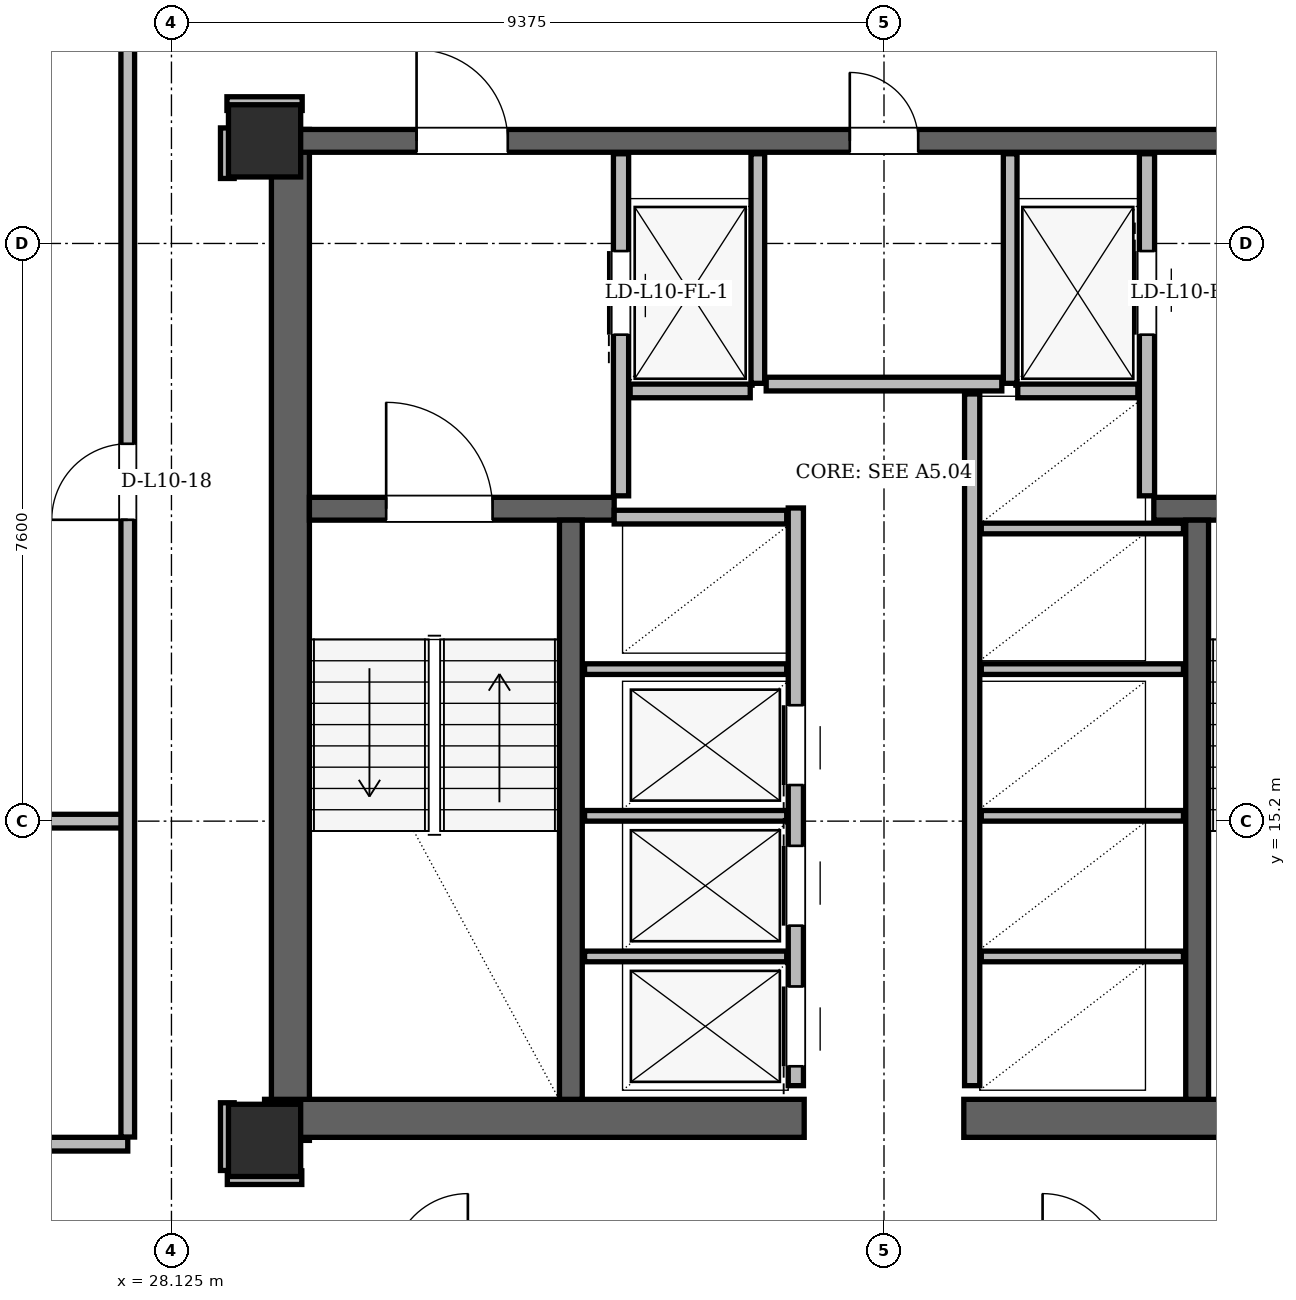
"""IFC4 building model, lengths in metres.
Left out: names, types, materials, properties, quantities, classifications, styles, units other than length and angle.
Written with IfcOpenShell. Run it as: python <this file> out.ifc"""

import sys

from ifc_helpers import new_model, si_unit, direction, frame, frame_2d, origin, origin_2d, place, context, subcontext, project, spatial, rectangle, hollow_rectangle, extrude, element, fill, save


model = new_model("IFC4")
c1 = context("Model", 3, precision=1e-05, world=origin(), true_north=direction((0.0, 1.0)))
c2 = subcontext(c1, "Body", "Model", "MODEL_VIEW")
j1 = project(units=[si_unit("LENGTHUNIT", "METRE"), si_unit("PLANEANGLEUNIT", "RADIAN")], contexts=[c1])
p1 = place(None, origin())
s1 = spatial("IfcSite", under=j1, at=p1, CompositionType="ELEMENT")
p2 = place(p1, origin())
s2 = spatial("IfcBuilding", under=s1, at=p2, CompositionType="ELEMENT")
p3 = place(p2, frame((0.0, 0.0, 41.7)))
s3 = spatial("IfcBuildingStorey", under=s2, at=p3, CompositionType="ELEMENT", Elevation=41.7)
for number, where, z_axis, x_axis in (
    (1, (29.35, 11.0, 0.0), (0.0, 0.0, 1.0), (1.0, 0.0, 0.0)),
    (2, (29.35, 24.15, 0.0), (0.0, 0.0, 1.0), (1.0, 0.0, 0.0)),
):
    element("IfcColumn", number, at=place(p3, frame(where, z_axis=z_axis, x_axis=x_axis)), inside=s3, PredefinedType="COLUMN", context=c2, shape_type="SweptSolid", body=[
        extrude(hollow_rectangle(XDim=0.95, YDim=0.95, WallThickness=0.08, at=origin_2d()), origin(), (0.0, 0.0, 1.0), 3.6),
    ])
p4 = place(p3, frame((29.69, 11.0, 0.0), z_axis=(0.0, 0.0, 1.0), x_axis=(0.0, 1.0, 0.0)))
e3 = element("IfcWall", 3, at=p4, inside=s3, PredefinedType="SHEAR", context=c2, shape_type="SweptSolid", body=[
    extrude(rectangle(XDim=13.3, YDim=0.5, at=frame_2d((6.65, 0.0))), origin(), (0.0, 0.0, 1.0), 3.36),
])
for number, where, z_axis, x_axis in (
    (4, (29.35, 11.29, 0.0), (0.0, 0.0, 1.0), (1.0, 0.0, 0.0)),
    (5, (38.55, 11.29, 0.0), (0.0, 0.0, 1.0), (1.0, 0.0, 0.0)),
):
    element("IfcWall", number, at=place(p3, frame(where, z_axis=z_axis, x_axis=x_axis)), inside=s3, PredefinedType="SHEAR", context=c2, shape_type="SweptSolid", body=[
        extrude(rectangle(XDim=7.1, YDim=0.5, at=frame_2d((3.55, 0.0))), origin(), (0.0, 0.0, 1.0), 3.36),
    ])
p5 = place(p3, frame((29.65, 24.15, 0.0), z_axis=(0.0, 0.0, 1.0), x_axis=(1.0, 0.0, 0.0)))
e6 = element("IfcWall", 6, at=p5, inside=s3, PredefinedType="SHEAR", context=c2, shape_type="SweptSolid", body=[
    extrude(rectangle(XDim=15.7, YDim=0.3, at=frame_2d((7.85, 0.0))), origin(), (0.0, 0.0, 1.0), 3.36),
])
p6 = place(p5, frame((1.7, 0.0, 0.0)))
e7 = element("IfcOpeningElement", 7, at=p6, cuts=e6, PredefinedType="OPENING", context=c2, shape_type="SweptSolid", body=[
    extrude(rectangle(XDim=1.2, YDim=2.2, at=frame_2d((0.6, 1.1))), frame((0.0, 0.15, 0.0), z_axis=(0.0, -1.0, 0.0), x_axis=(1.0, 0.0, 0.0)), (0.0, 0.0, 1.0), 0.3),
])
p7 = place(p5, frame((12.8, 0.0, 0.0)))
e8 = element("IfcOpeningElement", 8, at=p7, cuts=e6, PredefinedType="OPENING", context=c2, shape_type="SweptSolid", body=[
    extrude(rectangle(XDim=1.2, YDim=2.2, at=frame_2d((0.6, 1.1))), frame((0.0, 0.15, 0.0), z_axis=(0.0, -1.0, 0.0), x_axis=(1.0, 0.0, 0.0)), (0.0, 0.0, 1.0), 0.3),
])
p8 = place(p5, frame((7.4, 0.0, 0.0)))
e9 = element("IfcOpeningElement", 9, at=p8, cuts=e6, PredefinedType="OPENING", context=c2, shape_type="SweptSolid", body=[
    extrude(rectangle(XDim=0.9, YDim=2.05, at=frame_2d((0.45, 1.025))), frame((0.0, 0.15, 0.0), z_axis=(0.0, -1.0, 0.0), x_axis=(1.0, 0.0, 0.0)), (0.0, 0.0, 1.0), 0.3),
])
p9 = place(p3, frame((29.94, 19.31, 0.0), z_axis=(0.0, 0.0, 1.0), x_axis=(1.0, 0.0, 0.0)))
e10 = element("IfcWall", 10, at=p9, inside=s3, PredefinedType="SHEAR", context=c2, shape_type="SweptSolid", body=[
    extrude(rectangle(XDim=4.01, YDim=0.3, at=frame_2d((2.005, 0.0))), origin(), (0.0, 0.0, 1.0), 3.36),
])
p10 = place(p9, frame((1.01, 0.0, 0.0)))
e11 = element("IfcOpeningElement", 11, at=p10, cuts=e10, PredefinedType="OPENING", context=c2, shape_type="SweptSolid", body=[
    extrude(rectangle(XDim=1.4, YDim=2.2, at=frame_2d((0.7, 1.1))), frame((0.0, 0.15, 0.0), z_axis=(0.0, -1.0, 0.0), x_axis=(1.0, 0.0, 0.0)), (0.0, 0.0, 1.0), 0.3),
])
p11 = place(p3, frame((41.05, 19.31, 0.0), z_axis=(0.0, 0.0, 1.0), x_axis=(1.0, 0.0, 0.0)))
e12 = element("IfcWall", 12, at=p11, inside=s3, PredefinedType="SHEAR", context=c2, shape_type="SweptSolid", body=[
    extrude(rectangle(XDim=4.01, YDim=0.3, at=frame_2d((2.005, 0.0))), origin(), (0.0, 0.0, 1.0), 3.36),
])
p12 = place(p11, frame((1.6, 0.0, 0.0)))
e13 = element("IfcOpeningElement", 13, at=p12, cuts=e12, PredefinedType="OPENING", context=c2, shape_type="SweptSolid", body=[
    extrude(rectangle(XDim=1.4, YDim=2.2, at=frame_2d((0.7, 1.1))), frame((0.0, 0.15, 0.0), z_axis=(0.0, -1.0, 0.0), x_axis=(1.0, 0.0, 0.0)), (0.0, 0.0, 1.0), 0.3),
])
for number, where, z_axis, x_axis in (
    (14, (33.38, 11.54, 0.0), (0.0, 0.0, 1.0), (0.0, 1.0, 0.0)),
    (15, (41.62, 11.54, 0.0), (0.0, 0.0, 1.0), (0.0, 1.0, 0.0)),
):
    element("IfcWall", number, at=place(p3, frame(where, z_axis=z_axis, x_axis=x_axis)), inside=s3, PredefinedType="SHEAR", context=c2, shape_type="SweptSolid", body=[
        extrude(rectangle(XDim=7.62, YDim=0.3, at=frame_2d((3.81, 0.0))), origin(), (0.0, 0.0, 1.0), 3.36),
    ])
p13 = place(p3, frame((29.911, 43.603, 0.0), z_axis=(0.0, 0.0, 1.0), x_axis=(-0.500002585961, -0.866023910774, 0.0)))
e16 = element("IfcWall", 16, at=p13, inside=s3, PredefinedType="SOLIDWALL", context=c2, shape_type="SweptSolid", body=[
    extrude(rectangle(XDim=33.118, YDim=0.34, at=frame_2d((16.559, 0.0))), origin(), (0.0, 0.0, 1.0), 2.494),
])
p14 = place(p13, frame((6.369, 0.0, 0.0)))
e17 = element("IfcOpeningElement", 17, at=p14, cuts=e16, PredefinedType="OPENING", context=c2, shape_type="SweptSolid", body=[
    extrude(rectangle(XDim=1.5, YDim=2.2, at=frame_2d((0.75, 1.1))), frame((0.0, 0.17, 0.0), z_axis=(0.0, -1.0, 0.0), x_axis=(1.0, 0.0, 0.0)), (0.0, 0.0, 1.0), 0.34),
])
p15 = place(p13, frame((25.574, 0.0, 0.0)))
e18 = element("IfcOpeningElement", 18, at=p15, cuts=e16, PredefinedType="OPENING", context=c2, shape_type="SweptSolid", body=[
    extrude(rectangle(XDim=1.3, YDim=2.2, at=frame_2d((0.65, 1.1))), frame((0.0, 0.17, 0.0), z_axis=(0.0, -1.0, 0.0), x_axis=(1.0, 0.0, 0.0)), (0.0, 0.0, 1.0), 0.34),
])
p16 = place(p13, frame((11.131, 0.0, 0.85)))
e19 = element("IfcOpeningElement", 19, at=p16, cuts=e16, PredefinedType="OPENING", context=c2, shape_type="SweptSolid", body=[
    extrude(rectangle(XDim=2.0, YDim=1.534, at=frame_2d((1.0, 0.767))), frame((0.0, 0.17, 0.0), z_axis=(0.0, -1.0, 0.0), x_axis=(1.0, 0.0, 0.0)), (0.0, 0.0, 1.0), 0.34),
])
p17 = place(p13, frame((18.613, 0.0, 0.85)))
e20 = element("IfcOpeningElement", 20, at=p17, cuts=e16, PredefinedType="OPENING", context=c2, shape_type="SweptSolid", body=[
    extrude(rectangle(XDim=1.4, YDim=1.534, at=frame_2d((0.7, 0.767))), frame((0.0, 0.17, 0.0), z_axis=(0.0, -1.0, 0.0), x_axis=(1.0, 0.0, 0.0)), (0.0, 0.0, 1.0), 0.34),
])
p18 = place(p13, frame((30.251, 0.0, 0.85)))
e21 = element("IfcOpeningElement", 21, at=p18, cuts=e16, PredefinedType="OPENING", context=c2, shape_type="SweptSolid", body=[
    extrude(rectangle(XDim=1.8, YDim=1.534, at=frame_2d((0.9, 0.767))), frame((0.0, 0.17, 0.0), z_axis=(0.0, -1.0, 0.0), x_axis=(1.0, 0.0, 0.0)), (0.0, 0.0, 1.0), 0.34),
])
p19 = place(p13, frame((28.524, 0.0, 0.85)))
e22 = element("IfcOpeningElement", 22, at=p19, cuts=e16, PredefinedType="OPENING", context=c2, shape_type="SweptSolid", body=[
    extrude(rectangle(XDim=1.2, YDim=1.48, at=frame_2d((0.6, 0.74))), frame((0.0, 0.17, 0.0), z_axis=(0.0, -1.0, 0.0), x_axis=(1.0, 0.0, 0.0)), (0.0, 0.0, 1.0), 0.34),
])
p20 = place(p3, frame((34.04, 19.48, 0.0), z_axis=(0.0, 0.0, 1.0), x_axis=(0.0, 1.0, 0.0)))
e23 = element("IfcWall", 23, at=p20, inside=s3, PredefinedType="PARTITIONING", context=c2, shape_type="SweptSolid", body=[
    extrude(rectangle(XDim=4.5, YDim=0.2, at=frame_2d((2.25, 0.0))), origin(), (0.0, 0.0, 1.0), 2.4),
])
p21 = place(p20, frame((2.12, 0.0, 0.0)))
e24 = element("IfcOpeningElement", 24, at=p21, cuts=e23, PredefinedType="OPENING", context=c2, shape_type="SweptSolid", body=[
    extrude(rectangle(XDim=1.1, YDim=2.2, at=frame_2d((0.55, 1.1))), frame((0.0, 0.1, 0.0), z_axis=(0.0, -1.0, 0.0), x_axis=(1.0, 0.0, 0.0)), (0.0, 0.0, 1.0), 0.2),
])
p22 = place(p3, frame((35.84, 20.96, 0.0), z_axis=(0.0, 0.0, 1.0), x_axis=(0.0, 1.0, 0.0)))
e25 = element("IfcWall", 25, at=p22, inside=s3, PredefinedType="PARTITIONING", context=c2, shape_type="SweptSolid", body=[
    extrude(rectangle(XDim=3.02, YDim=0.18, at=frame_2d((1.51, 0.0))), origin(), (0.0, 0.0, 1.0), 2.4),
])
p23 = place(p3, frame((34.16, 20.86, 0.0), z_axis=(0.0, 0.0, 1.0), x_axis=(1.0, 0.0, 0.0)))
e26 = element("IfcWall", 26, at=p23, inside=s3, PredefinedType="PARTITIONING", context=c2, shape_type="SweptSolid", body=[
    extrude(rectangle(XDim=1.58, YDim=0.18, at=frame_2d((0.79, 0.0))), origin(), (0.0, 0.0, 1.0), 3.36),
])
p24 = place(p3, frame((40.96, 19.48, 0.0), z_axis=(0.0, 0.0, 1.0), x_axis=(0.0, 1.0, 0.0)))
e27 = element("IfcWall", 27, at=p24, inside=s3, PredefinedType="PARTITIONING", context=c2, shape_type="SweptSolid", body=[
    extrude(rectangle(XDim=4.5, YDim=0.2, at=frame_2d((2.25, 0.0))), origin(), (0.0, 0.0, 1.0), 2.4),
])
p25 = place(p24, frame((2.12, 0.0, 0.0)))
e28 = element("IfcOpeningElement", 28, at=p25, cuts=e27, PredefinedType="OPENING", context=c2, shape_type="SweptSolid", body=[
    extrude(rectangle(XDim=1.1, YDim=2.2, at=frame_2d((0.55, 1.1))), frame((0.0, 0.1, 0.0), z_axis=(0.0, -1.0, 0.0), x_axis=(1.0, 0.0, 0.0)), (0.0, 0.0, 1.0), 0.2),
])
p26 = place(p3, frame((39.16, 20.96, 0.0), z_axis=(0.0, 0.0, 1.0), x_axis=(0.0, 1.0, 0.0)))
e29 = element("IfcWall", 29, at=p26, inside=s3, PredefinedType="PARTITIONING", context=c2, shape_type="SweptSolid", body=[
    extrude(rectangle(XDim=3.02, YDim=0.18, at=frame_2d((1.51, 0.0))), origin(), (0.0, 0.0, 1.0), 2.4),
])
p27 = place(p3, frame((39.26, 20.86, 0.0), z_axis=(0.0, 0.0, 1.0), x_axis=(1.0, 0.0, 0.0)))
e30 = element("IfcWall", 30, at=p27, inside=s3, PredefinedType="PARTITIONING", context=c2, shape_type="SweptSolid", body=[
    extrude(rectangle(XDim=1.58, YDim=0.18, at=frame_2d((0.79, 0.0))), origin(), (0.0, 0.0, 1.0), 3.36),
])
p28 = place(p3, frame((36.34, 11.72, 0.0), z_axis=(0.0, 0.0, 1.0), x_axis=(0.0, 1.0, 0.0)))
e31 = element("IfcWall", 31, at=p28, inside=s3, PredefinedType="PARTITIONING", context=c2, shape_type="SweptSolid", body=[
    extrude(rectangle(XDim=7.6, YDim=0.2, at=frame_2d((3.8, 0.0))), origin(), (0.0, 0.0, 1.0), 3.36),
])
p29 = place(p28, frame((0.255, 0.0, 0.0)))
e32 = element("IfcOpeningElement", 32, at=p29, cuts=e31, PredefinedType="OPENING", context=c2, shape_type="SweptSolid", body=[
    extrude(rectangle(XDim=1.05, YDim=2.15, at=frame_2d((0.525, 1.075))), frame((0.0, 0.1, 0.0), z_axis=(0.0, -1.0, 0.0), x_axis=(1.0, 0.0, 0.0)), (0.0, 0.0, 1.0), 0.2),
])
p30 = place(p28, frame((2.105, 0.0, 0.0)))
e33 = element("IfcOpeningElement", 33, at=p30, cuts=e31, PredefinedType="OPENING", context=c2, shape_type="SweptSolid", body=[
    extrude(rectangle(XDim=1.05, YDim=2.15, at=frame_2d((0.525, 1.075))), frame((0.0, 0.1, 0.0), z_axis=(0.0, -1.0, 0.0), x_axis=(1.0, 0.0, 0.0)), (0.0, 0.0, 1.0), 0.2),
])
p31 = place(p28, frame((3.955, 0.0, 0.0)))
e34 = element("IfcOpeningElement", 34, at=p31, cuts=e31, PredefinedType="OPENING", context=c2, shape_type="SweptSolid", body=[
    extrude(rectangle(XDim=1.05, YDim=2.15, at=frame_2d((0.525, 1.075))), frame((0.0, 0.1, 0.0), z_axis=(0.0, -1.0, 0.0), x_axis=(1.0, 0.0, 0.0)), (0.0, 0.0, 1.0), 0.2),
])
p32 = place(p3, frame((33.95, 19.2, 0.0), z_axis=(0.0, 0.0, 1.0), x_axis=(1.0, 0.0, 0.0)))
e35 = element("IfcWall", 35, at=p32, inside=s3, PredefinedType="PARTITIONING", context=c2, shape_type="SweptSolid", body=[
    extrude(rectangle(XDim=2.27, YDim=0.18, at=frame_2d((1.135, 0.0))), origin(), (0.0, 0.0, 1.0), 3.36),
])
for number, where, z_axis, x_axis in (
    (36, (33.56, 13.42, 0.0), (0.0, 0.0, 1.0), (1.0, 0.0, 0.0)),
    (37, (33.56, 15.27, 0.0), (0.0, 0.0, 1.0), (1.0, 0.0, 0.0)),
    (38, (33.56, 17.2, 0.0), (0.0, 0.0, 1.0), (1.0, 0.0, 0.0)),
):
    element("IfcWall", number, at=place(p3, frame(where, z_axis=z_axis, x_axis=x_axis)), inside=s3, PredefinedType="PARTITIONING", context=c2, shape_type="SweptSolid", body=[
        extrude(rectangle(XDim=2.66, YDim=0.14, at=frame_2d((1.33, 0.0))), origin(), (0.0, 0.0, 1.0), 3.36),
    ])
p33 = place(p3, frame((38.66, 11.72, 0.0), z_axis=(0.0, 0.0, 1.0), x_axis=(0.0, 1.0, 0.0)))
e39 = element("IfcWall", 39, at=p33, inside=s3, PredefinedType="PARTITIONING", context=c2, shape_type="SweptSolid", body=[
    extrude(rectangle(XDim=9.1, YDim=0.2, at=frame_2d((4.55, 0.0))), origin(), (0.0, 0.0, 1.0), 3.36),
])
for number, where, z_axis, x_axis in (
    (40, (38.78, 13.42, 0.0), (0.0, 0.0, 1.0), (1.0, 0.0, 0.0)),
    (41, (38.78, 15.27, 0.0), (0.0, 0.0, 1.0), (1.0, 0.0, 0.0)),
    (42, (38.78, 17.2, 0.0), (0.0, 0.0, 1.0), (1.0, 0.0, 0.0)),
    (43, (38.78, 19.05, 0.0), (0.0, 0.0, 1.0), (1.0, 0.0, 0.0)),
):
    element("IfcWall", number, at=place(p3, frame(where, z_axis=z_axis, x_axis=x_axis)), inside=s3, PredefinedType="PARTITIONING", context=c2, shape_type="SweptSolid", body=[
        extrude(rectangle(XDim=2.66, YDim=0.14, at=frame_2d((1.33, 0.0))), origin(), (0.0, 0.0, 1.0), 3.36),
    ])
p34 = place(p3, frame((35.95, 20.95, 0.0), z_axis=(0.0, 0.0, 1.0), x_axis=(1.0, 0.0, 0.0)))
e44 = element("IfcWall", 44, at=p34, inside=s3, PredefinedType="PARTITIONING", context=c2, shape_type="SweptSolid", body=[
    extrude(rectangle(XDim=3.1, YDim=0.18, at=frame_2d((1.55, 0.0))), origin(), (0.0, 0.0, 1.0), 3.36),
])
p35 = place(p3, frame((28.86, 10.51, 0.0), z_axis=(0.0, 0.0, 1.0), x_axis=(1.0, 0.0, 0.0)))
e45 = element("IfcWall", 45, at=p35, inside=s3, PredefinedType="PARTITIONING", context=c2, shape_type="SweptSolid", body=[
    extrude(rectangle(XDim=0.98, YDim=0.18, at=frame_2d((0.49, 0.0))), origin(), (0.0, 0.0, 1.0), 2.738),
])
p36 = place(p3, frame((19.2, 10.95, 0.0), z_axis=(0.0, 0.0, 1.0), x_axis=(1.0, 0.0, 0.0)))
e46 = element("IfcWall", 46, at=p36, inside=s3, PredefinedType="PARTITIONING", context=c2, shape_type="SweptSolid", body=[
    extrude(rectangle(XDim=8.35, YDim=0.18, at=frame_2d((4.175, 0.0))), origin(), (0.0, 0.0, 1.0), 3.36),
])
p37 = place(p3, frame((13.799, 15.2, 0.0), z_axis=(0.0, 0.0, 1.0), x_axis=(1.0, 0.0, 0.0)))
e47 = element("IfcWall", 47, at=p37, inside=s3, PredefinedType="PARTITIONING", context=c2, shape_type="SweptSolid", body=[
    extrude(rectangle(XDim=13.751, YDim=0.18, at=frame_2d((6.876, 0.0))), origin(), (0.0, 0.0, 1.0), 2.946),
])
p38 = place(p3, frame((28.855, 24.64, 0.0), z_axis=(0.0, 0.0, 1.0), x_axis=(1.0, 0.0, 0.0)))
e48 = element("IfcWall", 48, at=p38, inside=s3, PredefinedType="PARTITIONING", context=c2, shape_type="SweptSolid", body=[
    extrude(rectangle(XDim=0.99, YDim=0.18, at=frame_2d((0.495, 0.0))), origin(), (0.0, 0.0, 1.0), 2.738),
])
p39 = place(p3, frame((27.55, 11.044, 0.0), z_axis=(0.0, 0.0, 1.0), x_axis=(0.0, 1.0, 0.0)))
e49 = element("IfcWall", 49, at=p39, inside=s3, PredefinedType="PARTITIONING", context=c2, shape_type="SweptSolid", body=[
    extrude(rectangle(XDim=28.121, YDim=0.18, at=frame_2d((14.061, 0.0))), origin(), (0.0, 0.0, 1.0), 2.494),
])
p40 = place(p39, frame((8.121, 0.0, 0.0)))
e50 = element("IfcOpeningElement", 50, at=p40, cuts=e49, PredefinedType="OPENING", context=c2, shape_type="SweptSolid", body=[
    extrude(rectangle(XDim=1.0, YDim=2.18, at=frame_2d((0.5, 1.09))), frame((0.0, 0.09, 0.0), z_axis=(0.0, -1.0, 0.0), x_axis=(1.0, 0.0, 0.0)), (0.0, 0.0, 1.0), 0.18),
])
p41 = place(p3, frame((28.86, 10.604, 0.0), z_axis=(0.0, 0.0, 1.0), x_axis=(0.0, 1.0, 0.0)))
e51 = element("IfcWall", 51, at=p41, inside=s3, PredefinedType="PARTITIONING", context=c2, shape_type="SweptSolid", body=[
    extrude(rectangle(XDim=0.891, YDim=0.18, at=frame_2d((0.446, 0.0))), origin(), (0.0, 0.0, 1.0), 2.738),
])
p42 = place(p3, frame((28.86, 23.655, 0.0), z_axis=(0.0, 0.0, 1.0), x_axis=(0.0, 1.0, 0.0)))
e52 = element("IfcWall", 52, at=p42, inside=s3, PredefinedType="PARTITIONING", context=c2, shape_type="SweptSolid", body=[
    extrude(rectangle(XDim=0.665, YDim=0.18, at=frame_2d((0.333, 0.0))), origin(), (0.0, 0.0, 1.0), 3.36),
])
p43 = place(p21, origin())
e53 = element("IfcDoor", 53, at=p43, inside=s3, OperationType="SLIDING_TO_LEFT", PredefinedType="DOOR", context=c2, shape_type="SweptSolid", body=[
    extrude(rectangle(XDim=1.1, YDim=2.2, at=frame_2d((0.55, 1.1))), frame((0.0, 0.025, 0.0), z_axis=(0.0, -1.0, 0.0), x_axis=(1.0, 0.0, 0.0)), (0.0, 0.0, 1.0), 0.05),
])
fill(e24, e53)
p44 = place(p25, origin())
e54 = element("IfcDoor", 54, at=p44, inside=s3, OperationType="SLIDING_TO_RIGHT", PredefinedType="DOOR", context=c2, shape_type="SweptSolid", body=[
    extrude(rectangle(XDim=1.1, YDim=2.2, at=frame_2d((0.55, 1.1))), frame((0.0, 0.025, 0.0), z_axis=(0.0, -1.0, 0.0), x_axis=(1.0, 0.0, 0.0)), (0.0, 0.0, 1.0), 0.05),
])
fill(e28, e54)
p45 = place(p29, origin())
e55 = element("IfcDoor", 55, at=p45, inside=s3, OperationType="SLIDING_TO_LEFT", PredefinedType="DOOR", context=c2, shape_type="SweptSolid", body=[
    extrude(rectangle(XDim=1.05, YDim=2.15, at=frame_2d((0.525, 1.075))), frame((0.0, 0.025, 0.0), z_axis=(0.0, -1.0, 0.0), x_axis=(1.0, 0.0, 0.0)), (0.0, 0.0, 1.0), 0.05),
])
fill(e32, e55)
p46 = place(p30, origin())
e56 = element("IfcDoor", 56, at=p46, inside=s3, OperationType="SLIDING_TO_RIGHT", PredefinedType="DOOR", context=c2, shape_type="SweptSolid", body=[
    extrude(rectangle(XDim=1.05, YDim=2.15, at=frame_2d((0.525, 1.075))), frame((0.0, 0.025, 0.0), z_axis=(0.0, -1.0, 0.0), x_axis=(1.0, 0.0, 0.0)), (0.0, 0.0, 1.0), 0.05),
])
fill(e33, e56)
p47 = place(p31, origin())
e57 = element("IfcDoor", 57, at=p47, inside=s3, OperationType="SLIDING_TO_LEFT", PredefinedType="DOOR", context=c2, shape_type="SweptSolid", body=[
    extrude(rectangle(XDim=1.05, YDim=2.15, at=frame_2d((0.525, 1.075))), frame((0.0, 0.025, 0.0), z_axis=(0.0, -1.0, 0.0), x_axis=(1.0, 0.0, 0.0)), (0.0, 0.0, 1.0), 0.05),
])
fill(e34, e57)
p48 = place(p10, origin())
e58 = element("IfcDoor", 58, at=p48, inside=s3, OperationType="SINGLE_SWING_LEFT", PredefinedType="DOOR", context=c2, shape_type="SweptSolid", body=[
    extrude(rectangle(XDim=1.4, YDim=2.2, at=frame_2d((0.7, 1.1))), frame((0.0, 0.025, 0.0), z_axis=(0.0, -1.0, 0.0), x_axis=(1.0, 0.0, 0.0)), (0.0, 0.0, 1.0), 0.05),
])
fill(e11, e58)
p49 = place(p6, origin())
e59 = element("IfcDoor", 59, at=p49, inside=s3, OperationType="SINGLE_SWING_LEFT", PredefinedType="DOOR", context=c2, shape_type="SweptSolid", body=[
    extrude(rectangle(XDim=1.2, YDim=2.2, at=frame_2d((0.6, 1.1))), frame((0.0, 0.025, 0.0), z_axis=(0.0, -1.0, 0.0), x_axis=(1.0, 0.0, 0.0)), (0.0, 0.0, 1.0), 0.05),
])
fill(e7, e59)
p50 = place(p8, origin())
e60 = element("IfcDoor", 60, at=p50, inside=s3, OperationType="SINGLE_SWING_LEFT", PredefinedType="DOOR", context=c2, shape_type="SweptSolid", body=[
    extrude(rectangle(XDim=0.9, YDim=2.05, at=frame_2d((0.45, 1.025))), frame((0.0, 0.025, 0.0), z_axis=(0.0, -1.0, 0.0), x_axis=(1.0, 0.0, 0.0)), (0.0, 0.0, 1.0), 0.05),
])
fill(e9, e60)
p51 = place(p40, origin())
e61 = element("IfcDoor", 61, at=p51, inside=s3, OperationType="SINGLE_SWING_LEFT", PredefinedType="DOOR", context=c2, shape_type="SweptSolid", body=[
    extrude(rectangle(XDim=1.0, YDim=2.18, at=frame_2d((0.5, 1.09))), frame((0.0, 0.025, 0.0), z_axis=(0.0, -1.0, 0.0), x_axis=(1.0, 0.0, 0.0)), (0.0, 0.0, 1.0), 0.05),
])
fill(e50, e61)
save(model, sys.argv[1])
